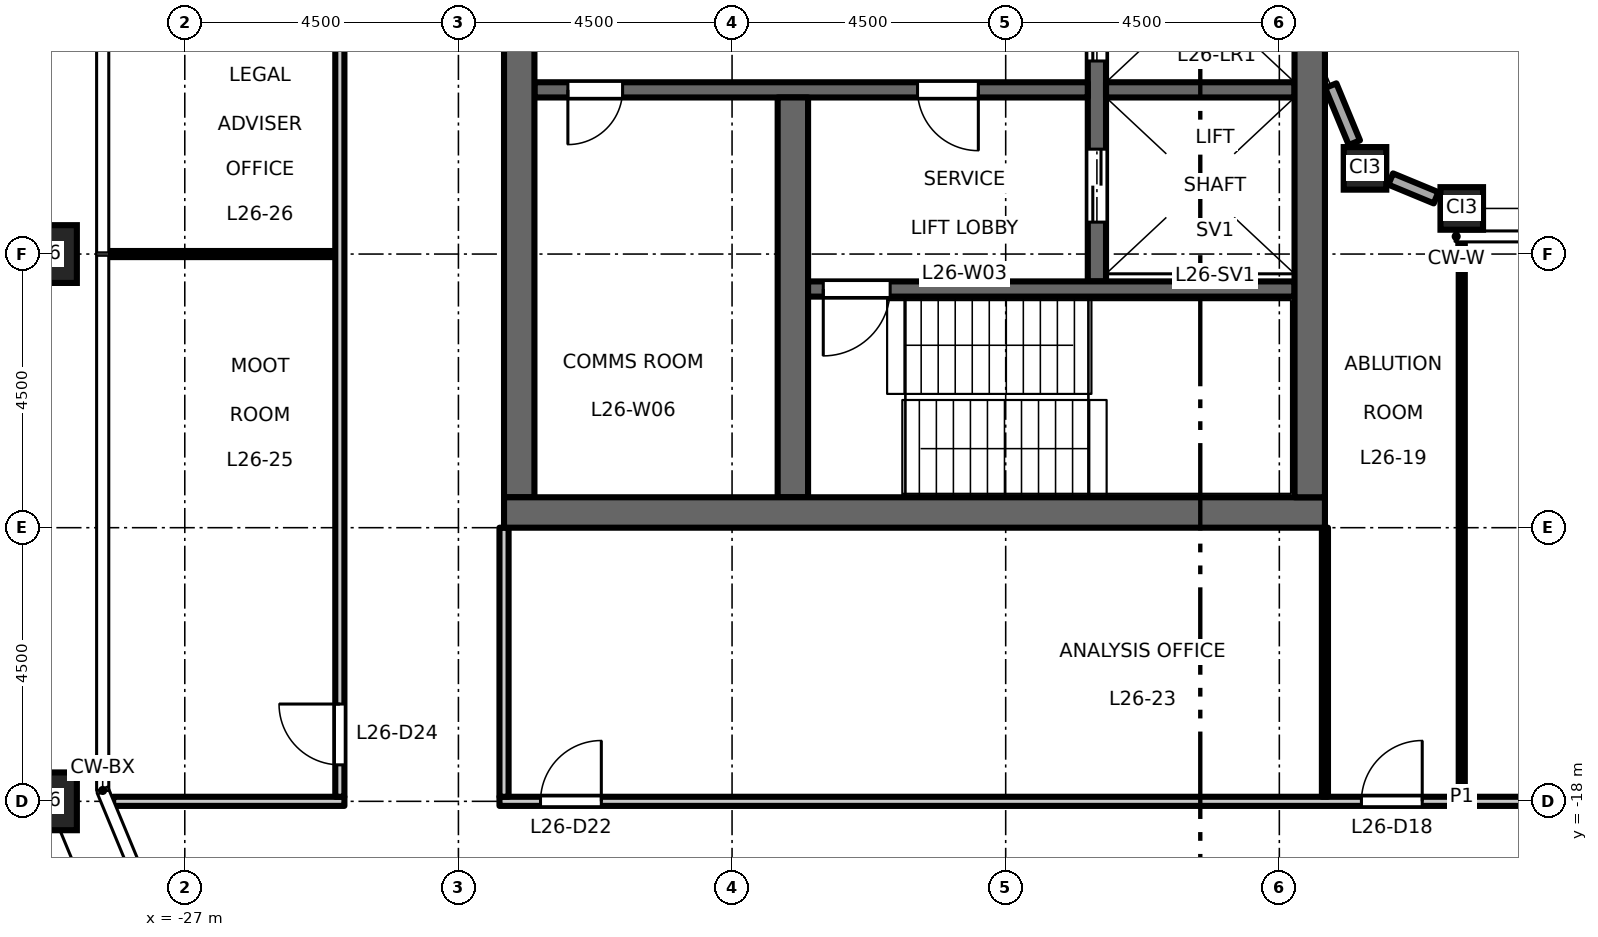
"""IFC4 building model, lengths in metres.
Left out: names, types, materials, properties, quantities, classifications, styles, units other than length and angle.
Written with IfcOpenShell. Run it as: python <this file> out.ifc"""

import sys

from ifc_helpers import new_model, si_unit, direction, frame, frame_2d, origin, origin_2d, place, context, subcontext, project, spatial, rectangle, hollow_rectangle, extrude, element, fill, save


model = new_model("IFC4")
c1 = context("Model", 3, precision=1e-05, world=origin(), true_north=direction((0.0, 1.0)))
c2 = subcontext(c1, "Body", "Model", "MODEL_VIEW")
j1 = project(units=[si_unit("LENGTHUNIT", "METRE"), si_unit("PLANEANGLEUNIT", "RADIAN")], contexts=[c1])
p1 = place(None, origin())
s1 = spatial("IfcSite", under=j1, at=p1, CompositionType="ELEMENT")
p2 = place(p1, origin())
s2 = spatial("IfcBuilding", under=s1, at=p2, CompositionType="ELEMENT")
p3 = place(p2, frame((0.0, 0.0, 122.7)))
s3 = spatial("IfcBuildingStorey", under=s2, at=p3, CompositionType="ELEMENT", Elevation=122.7)
for number, where, z_axis, x_axis in (
    (1, (-29.25, -9.0, 0.0), (0.0, 0.0, 1.0), (1.0, 0.0, 0.0)),
    (2, (-29.25, -18.0, 0.0), (0.0, 0.0, 1.0), (1.0, 0.0, 0.0)),
):
    element("IfcColumn", number, at=place(p3, frame(where, z_axis=z_axis, x_axis=x_axis)), inside=s3, PredefinedType="COLUMN", context=c2, shape_type="SweptSolid", body=[
        extrude(hollow_rectangle(XDim=0.95, YDim=0.95, WallThickness=0.055, at=origin_2d()), origin(), (0.0, 0.0, 1.0), 4.5),
    ])
for number, where, z_axis, x_axis in (
    (3, (-7.591, -7.591, 0.0), (0.0, 0.0, 1.0), (1.0, 0.0, 0.0)),
    (4, (-6.0, -8.25, 0.0), (0.0, 0.0, 1.0), (1.0, 0.0, 0.0)),
):
    element("IfcColumn", number, at=place(p3, frame(where, z_axis=z_axis, x_axis=x_axis)), inside=s3, PredefinedType="COLUMN", context=c2, shape_type="SweptSolid", body=[
        extrude(hollow_rectangle(XDim=0.7, YDim=0.7, WallThickness=0.04, at=origin_2d()), origin(), (0.0, 0.0, 1.0), 4.5),
    ])
p4 = place(p3, frame((-12.0, -9.45, 0.0), z_axis=(0.0, 0.0, 1.0), x_axis=(0.0, 1.0, 0.0)))
e5 = element("IfcWall", 5, at=p4, inside=s3, PredefinedType="SHEAR", context=c2, shape_type="SweptSolid", body=[
    extrude(rectangle(XDim=18.9, YDim=0.3, at=frame_2d((9.45, 0.0))), origin(), (0.0, 0.0, 1.0), 4.35),
])
p5 = place(p4, frame((3.625, 0.0, 0.0)))
e6 = element("IfcOpeningElement", 6, at=p5, cuts=e5, PredefinedType="OPENING", context=c2, shape_type="SweptSolid", body=[
    extrude(rectangle(XDim=1.1, YDim=2.1, at=frame_2d((0.55, 1.05))), frame((0.0, 0.16, 0.0), z_axis=(0.0, -1.0, 0.0), x_axis=(1.0, 0.0, 0.0)), (0.0, 0.0, 1.0), 0.32),
])
p6 = place(p4, frame((6.775, 0.0, 0.0)))
e7 = element("IfcOpeningElement", 7, at=p6, cuts=e5, PredefinedType="OPENING", context=c2, shape_type="SweptSolid", body=[
    extrude(rectangle(XDim=1.1, YDim=2.1, at=frame_2d((0.55, 1.05))), frame((0.0, 0.16, 0.0), z_axis=(0.0, -1.0, 0.0), x_axis=(1.0, 0.0, 0.0)), (0.0, 0.0, 1.0), 0.32),
])
p7 = place(p4, frame((9.925, 0.0, 0.0)))
e8 = element("IfcOpeningElement", 8, at=p7, cuts=e5, PredefinedType="OPENING", context=c2, shape_type="SweptSolid", body=[
    extrude(rectangle(XDim=1.1, YDim=2.1, at=frame_2d((0.55, 1.05))), frame((0.0, 0.16, 0.0), z_axis=(0.0, -1.0, 0.0), x_axis=(1.0, 0.0, 0.0)), (0.0, 0.0, 1.0), 0.32),
])
p8 = place(p4, frame((13.075, 0.0, 0.0)))
e9 = element("IfcOpeningElement", 9, at=p8, cuts=e5, PredefinedType="OPENING", context=c2, shape_type="SweptSolid", body=[
    extrude(rectangle(XDim=1.1, YDim=2.1, at=frame_2d((0.55, 1.05))), frame((0.0, 0.16, 0.0), z_axis=(0.0, -1.0, 0.0), x_axis=(1.0, 0.0, 0.0)), (0.0, 0.0, 1.0), 0.32),
])
p9 = place(p4, frame((16.725, 0.0, 0.0)))
e10 = element("IfcOpeningElement", 10, at=p9, cuts=e5, PredefinedType="OPENING", context=c2, shape_type="SweptSolid", body=[
    extrude(rectangle(XDim=1.2, YDim=2.1, at=frame_2d((0.6, 1.05))), frame((0.0, 0.16, 0.0), z_axis=(0.0, -1.0, 0.0), x_axis=(1.0, 0.0, 0.0)), (0.0, 0.0, 1.0), 0.32),
])
p10 = place(p4, frame((0.975, 0.0, 0.0)))
e11 = element("IfcOpeningElement", 11, at=p10, cuts=e5, PredefinedType="OPENING", context=c2, shape_type="SweptSolid", body=[
    extrude(rectangle(XDim=1.2, YDim=2.1, at=frame_2d((0.6, 1.05))), frame((0.0, 0.16, 0.0), z_axis=(0.0, -1.0, 0.0), x_axis=(1.0, 0.0, 0.0)), (0.0, 0.0, 1.0), 0.32),
])
p11 = place(p3, frame((-12.15, -6.3, 0.0), z_axis=(0.0, 0.0, 1.0), x_axis=(-1.0, 0.0, 0.0)))
e12 = element("IfcWall", 12, at=p11, inside=s3, PredefinedType="SHEAR", context=c2, shape_type="SweptSolid", body=[
    extrude(rectangle(XDim=9.1, YDim=0.25, at=frame_2d((4.55, 0.0))), origin(), (0.0, 0.0, 1.0), 4.35),
])
p12 = place(p11, frame((1.8, 0.0, 0.0)))
e13 = element("IfcOpeningElement", 13, at=p12, cuts=e12, PredefinedType="OPENING", context=c2, shape_type="SweptSolid", body=[
    extrude(rectangle(XDim=1.0, YDim=2.1, at=frame_2d((0.5, 1.05))), frame((0.0, 0.135, 0.0), z_axis=(0.0, -1.0, 0.0), x_axis=(1.0, 0.0, 0.0)), (0.0, 0.0, 1.0), 0.27),
])
p13 = place(p11, frame((7.65, 0.0, 0.0)))
e14 = element("IfcOpeningElement", 14, at=p13, cuts=e12, PredefinedType="OPENING", context=c2, shape_type="SweptSolid", body=[
    extrude(rectangle(XDim=0.9, YDim=2.1, at=frame_2d((0.45, 1.05))), frame((0.0, 0.135, 0.0), z_axis=(0.0, -1.0, 0.0), x_axis=(1.0, 0.0, 0.0)), (0.0, 0.0, 1.0), 0.27),
])
p14 = place(p3, frame((-21.5, -13.0, 0.0), z_axis=(0.0, 0.0, 1.0), x_axis=(0.0, 1.0, 0.0)))
e15 = element("IfcWall", 15, at=p14, inside=s3, PredefinedType="SHEAR", context=c2, shape_type="SweptSolid", body=[
    extrude(rectangle(XDim=26.0, YDim=0.5, at=frame_2d((13.0, 0.0))), origin(), (0.0, 0.0, 1.0), 4.35),
])
p15 = place(p14, frame((16.825, 0.0, 0.0)))
e16 = element("IfcOpeningElement", 16, at=p15, cuts=e15, PredefinedType="OPENING", context=c2, shape_type="SweptSolid", body=[
    extrude(rectangle(XDim=1.8, YDim=2.1, at=frame_2d((0.9, 1.05))), frame((0.0, 0.26, 0.0), z_axis=(0.0, -1.0, 0.0), x_axis=(1.0, 0.0, 0.0)), (0.0, 0.0, 1.0), 0.52),
])
p16 = place(p14, frame((7.375, 0.0, 0.0)))
e17 = element("IfcOpeningElement", 17, at=p16, cuts=e15, PredefinedType="OPENING", context=c2, shape_type="SweptSolid", body=[
    extrude(rectangle(XDim=1.8, YDim=2.1, at=frame_2d((0.9, 1.05))), frame((0.0, 0.26, 0.0), z_axis=(0.0, -1.0, 0.0), x_axis=(1.0, 0.0, 0.0)), (0.0, 0.0, 1.0), 0.52),
])
p17 = place(p3, frame((-17.0, -13.0, 0.0), z_axis=(0.0, 0.0, 1.0), x_axis=(0.0, 1.0, 0.0)))
e18 = element("IfcWall", 18, at=p17, inside=s3, PredefinedType="SHEAR", context=c2, shape_type="SweptSolid", body=[
    extrude(rectangle(XDim=6.575, YDim=0.5, at=frame_2d((3.288, 0.0))), origin(), (0.0, 0.0, 1.0), 4.35),
])
p18 = place(p3, frame((-8.75, -6.3, 0.0), z_axis=(0.0, 0.0, 1.0), x_axis=(-1.0, 0.0, 0.0)))
e19 = element("IfcWall", 19, at=p18, inside=s3, PredefinedType="SHEAR", context=c2, shape_type="SweptSolid", body=[
    extrude(rectangle(XDim=3.1, YDim=0.25, at=frame_2d((1.55, 0.0))), origin(), (0.0, 0.0, 1.0), 4.35),
])
p19 = place(p3, frame((-8.75, -9.575, 0.0), z_axis=(0.0, 0.0, 1.0), x_axis=(-1.0, 0.0, 0.0)))
e20 = element("IfcWall", 20, at=p19, inside=s3, PredefinedType="SHEAR", context=c2, shape_type="SweptSolid", body=[
    extrude(rectangle(XDim=8.0, YDim=0.25, at=frame_2d((4.0, 0.0))), origin(), (0.0, 0.0, 1.0), 4.35),
])
p20 = place(p19, frame((6.65, 0.0, 0.0)))
e21 = element("IfcOpeningElement", 21, at=p20, cuts=e20, PredefinedType="OPENING", context=c2, shape_type="SweptSolid", body=[
    extrude(rectangle(XDim=1.1, YDim=2.1, at=frame_2d((0.55, 1.05))), frame((0.0, 0.135, 0.0), z_axis=(0.0, -1.0, 0.0), x_axis=(1.0, 0.0, 0.0)), (0.0, 0.0, 1.0), 0.27),
])
p21 = place(p3, frame((-8.25, -13.25, 0.0), z_axis=(0.0, 0.0, 1.0), x_axis=(-1.0, 0.0, 0.0)))
e22 = element("IfcWall", 22, at=p21, inside=s3, PredefinedType="SHEAR", context=c2, shape_type="SweptSolid", body=[
    extrude(rectangle(XDim=13.5, YDim=0.5, at=frame_2d((6.75, 0.0))), origin(), (0.0, 0.0, 1.0), 4.35),
])
p22 = place(p3, frame((-8.5, -13.0, 0.0), z_axis=(0.0, 0.0, 1.0), x_axis=(0.0, 1.0, 0.0)))
e23 = element("IfcWall", 23, at=p22, inside=s3, PredefinedType="SHEAR", context=c2, shape_type="SweptSolid", body=[
    extrude(rectangle(XDim=26.0, YDim=0.5, at=frame_2d((13.0, 0.0))), origin(), (0.0, 0.0, 1.0), 4.35),
])
p23 = place(p3, frame((-8.154, -6.231, 0.0), z_axis=(0.0, 0.0, 1.0), x_axis=(0.382769662028, -0.923843810301, 0.0)))
e24 = element("IfcWall", 24, at=p23, inside=s3, PredefinedType="STANDARD", context=c2, shape_type="SweptSolid", body=[
    extrude(rectangle(XDim=1.015, YDim=0.2, at=frame_2d((0.507, 0.0))), origin(), (0.0, 0.0, 1.0), 3.826),
])
p24 = place(p3, frame((-7.168, -7.766, 0.0), z_axis=(0.0, 0.0, 1.0), x_axis=(0.923817771127, -0.382832503518, 0.0)))
e25 = element("IfcWall", 25, at=p24, inside=s3, PredefinedType="STANDARD", context=c2, shape_type="SweptSolid", body=[
    extrude(rectangle(XDim=0.807, YDim=0.2, at=frame_2d((0.404, 0.0))), origin(), (0.0, 0.0, 1.0), 3.826),
])
p25 = place(p3, frame((-28.178, -18.0, 0.0), z_axis=(0.0, 0.0, 1.0), x_axis=(1.0, 0.0, 0.0)))
e26 = element("IfcWall", 26, at=p25, inside=s3, PredefinedType="PARTITIONING", context=c2, shape_type="SweptSolid", body=[
    extrude(rectangle(XDim=3.803, YDim=0.15, at=frame_2d((1.901, 0.0))), origin(), (0.0, 0.0, 1.0), 4.35),
])
p26 = place(p3, frame((-21.825, -18.0, 0.0), z_axis=(0.0, 0.0, 1.0), x_axis=(1.0, 0.0, 0.0)))
e27 = element("IfcWall", 27, at=p26, inside=s3, PredefinedType="PARTITIONING", context=c2, shape_type="SweptSolid", body=[
    extrude(rectangle(XDim=43.65, YDim=0.15, at=frame_2d((21.825, 0.0))), origin(), (0.0, 0.0, 1.0), 4.35),
])
p27 = place(p26, frame((14.175, 0.0, 0.0)))
e28 = element("IfcOpeningElement", 28, at=p27, cuts=e27, PredefinedType="OPENING", context=c2, shape_type="SweptSolid", body=[
    extrude(rectangle(XDim=1.0, YDim=2.1, at=frame_2d((0.5, 1.05))), frame((0.0, 0.085, 0.0), z_axis=(0.0, -1.0, 0.0), x_axis=(1.0, 0.0, 0.0)), (0.0, 0.0, 1.0), 0.17),
])
p28 = place(p26, frame((28.425, 0.0, 0.0)))
e29 = element("IfcOpeningElement", 29, at=p28, cuts=e27, PredefinedType="OPENING", context=c2, shape_type="SweptSolid", body=[
    extrude(rectangle(XDim=1.0, YDim=2.1, at=frame_2d((0.5, 1.05))), frame((0.0, 0.085, 0.0), z_axis=(0.0, -1.0, 0.0), x_axis=(1.0, 0.0, 0.0)), (0.0, 0.0, 1.0), 0.17),
])
p29 = place(p26, frame((0.675, 0.0, 0.0)))
e30 = element("IfcOpeningElement", 30, at=p29, cuts=e27, PredefinedType="OPENING", context=c2, shape_type="SweptSolid", body=[
    extrude(rectangle(XDim=1.0, YDim=2.1, at=frame_2d((0.5, 1.05))), frame((0.0, 0.085, 0.0), z_axis=(0.0, -1.0, 0.0), x_axis=(1.0, 0.0, 0.0)), (0.0, 0.0, 1.0), 0.17),
])
p30 = place(p26, frame((41.925, 0.0, 0.0)))
e31 = element("IfcOpeningElement", 31, at=p30, cuts=e27, PredefinedType="OPENING", context=c2, shape_type="SweptSolid", body=[
    extrude(rectangle(XDim=1.0, YDim=2.1, at=frame_2d((0.5, 1.05))), frame((0.0, 0.085, 0.0), z_axis=(0.0, -1.0, 0.0), x_axis=(1.0, 0.0, 0.0)), (0.0, 0.0, 1.0), 0.17),
])
p31 = place(p3, frame((-28.26, -9.0, 0.0), z_axis=(0.0, 0.0, 1.0), x_axis=(1.0, 0.0, 0.0)))
e32 = element("IfcWall", 32, at=p31, inside=s3, PredefinedType="PARTITIONING", context=c2, shape_type="SweptSolid", body=[
    extrude(rectangle(XDim=3.735, YDim=0.1, at=frame_2d((1.868, 0.0))), origin(), (0.0, 0.0, 1.0), 4.35),
])
p32 = place(p3, frame((-24.45, -17.925, 0.0), z_axis=(0.0, 0.0, 1.0), x_axis=(0.0, 1.0, 0.0)))
e33 = element("IfcWall", 33, at=p32, inside=s3, PredefinedType="PARTITIONING", context=c2, shape_type="SweptSolid", body=[
    extrude(rectangle(XDim=35.85, YDim=0.15, at=frame_2d((17.925, 0.0))), origin(), (0.0, 0.0, 1.0), 4.35),
])
p33 = place(p32, frame((0.525, 0.0, 0.0)))
e34 = element("IfcOpeningElement", 34, at=p33, cuts=e33, PredefinedType="OPENING", context=c2, shape_type="SweptSolid", body=[
    extrude(rectangle(XDim=1.0, YDim=2.1, at=frame_2d((0.5, 1.05))), frame((0.0, 0.085, 0.0), z_axis=(0.0, -1.0, 0.0), x_axis=(1.0, 0.0, 0.0)), (0.0, 0.0, 1.0), 0.17),
])
p34 = place(p32, frame((16.275, 0.0, 0.0)))
e35 = element("IfcOpeningElement", 35, at=p34, cuts=e33, PredefinedType="OPENING", context=c2, shape_type="SweptSolid", body=[
    extrude(rectangle(XDim=1.0, YDim=2.1, at=frame_2d((0.5, 1.05))), frame((0.0, 0.085, 0.0), z_axis=(0.0, -1.0, 0.0), x_axis=(1.0, 0.0, 0.0)), (0.0, 0.0, 1.0), 0.17),
])
p35 = place(p32, frame((18.525, 0.0, 0.0)))
e36 = element("IfcOpeningElement", 36, at=p35, cuts=e33, PredefinedType="OPENING", context=c2, shape_type="SweptSolid", body=[
    extrude(rectangle(XDim=1.0, YDim=2.1, at=frame_2d((0.5, 1.05))), frame((0.0, 0.085, 0.0), z_axis=(0.0, -1.0, 0.0), x_axis=(1.0, 0.0, 0.0)), (0.0, 0.0, 1.0), 0.17),
])
p36 = place(p32, frame((34.275, 0.0, 0.0)))
e37 = element("IfcOpeningElement", 37, at=p36, cuts=e33, PredefinedType="OPENING", context=c2, shape_type="SweptSolid", body=[
    extrude(rectangle(XDim=1.0, YDim=2.1, at=frame_2d((0.5, 1.05))), frame((0.0, 0.085, 0.0), z_axis=(0.0, -1.0, 0.0), x_axis=(1.0, 0.0, 0.0)), (0.0, 0.0, 1.0), 0.17),
])
p37 = place(p3, frame((-21.75, -17.925, 0.0), z_axis=(0.0, 0.0, 1.0), x_axis=(0.0, 1.0, 0.0)))
e38 = element("IfcWall", 38, at=p37, inside=s3, PredefinedType="PARTITIONING", context=c2, shape_type="SweptSolid", body=[
    extrude(rectangle(XDim=4.425, YDim=0.15, at=frame_2d((2.212, 0.0))), origin(), (0.0, 0.0, 1.0), 4.35),
])
p38 = place(p3, frame((-8.25, -17.925, 0.0), z_axis=(0.0, 0.0, 1.0), x_axis=(0.0, 1.0, 0.0)))
e39 = element("IfcWall", 39, at=p38, inside=s3, PredefinedType="PARTITIONING", context=c2, shape_type="SweptSolid", body=[
    extrude(rectangle(XDim=4.425, YDim=0.1, at=frame_2d((2.212, 0.0))), origin(), (0.0, 0.0, 1.0), 4.35),
])
p39 = place(p3, frame((-6.0, -17.925, 0.0), z_axis=(0.0, 0.0, 1.0), x_axis=(0.0, 1.0, 0.0)))
e40 = element("IfcWall", 40, at=p39, inside=s3, PredefinedType="PARTITIONING", context=c2, shape_type="SweptSolid", body=[
    extrude(rectangle(XDim=9.275, YDim=0.1, at=frame_2d((4.638, 0.0))), origin(), (0.0, 0.0, 1.0), 4.35),
])
p40 = place(p12, origin())
e41 = element("IfcDoor", 41, at=p40, inside=s3, OperationType="SINGLE_SWING_RIGHT", PredefinedType="DOOR", context=c2, shape_type="SweptSolid", body=[
    extrude(rectangle(XDim=1.0, YDim=2.1, at=frame_2d((0.5, 1.05))), frame((0.0, 0.025, 0.0), z_axis=(0.0, -1.0, 0.0), x_axis=(1.0, 0.0, 0.0)), (0.0, 0.0, 1.0), 0.05),
])
fill(e13, e41)
p41 = place(p20, origin())
e42 = element("IfcDoor", 42, at=p41, inside=s3, OperationType="SINGLE_SWING_LEFT", PredefinedType="DOOR", context=c2, shape_type="SweptSolid", body=[
    extrude(rectangle(XDim=1.1, YDim=2.1, at=frame_2d((0.55, 1.05))), frame((0.0, 0.025, 0.0), z_axis=(0.0, -1.0, 0.0), x_axis=(1.0, 0.0, 0.0)), (0.0, 0.0, 1.0), 0.05),
])
fill(e21, e42)
p42 = place(p5, origin())
e43 = element("IfcDoor", 43, at=p42, inside=s3, OperationType="DOUBLE_DOOR_SLIDING", PredefinedType="DOOR", context=c2, shape_type="SweptSolid", body=[
    extrude(rectangle(XDim=1.1, YDim=2.1, at=frame_2d((0.55, 1.05))), frame((0.0, 0.025, 0.0), z_axis=(0.0, -1.0, 0.0), x_axis=(1.0, 0.0, 0.0)), (0.0, 0.0, 1.0), 0.05),
])
fill(e6, e43)
p43 = place(p10, origin())
e44 = element("IfcDoor", 44, at=p43, inside=s3, OperationType="DOUBLE_DOOR_SLIDING", PredefinedType="DOOR", context=c2, shape_type="SweptSolid", body=[
    extrude(rectangle(XDim=1.2, YDim=2.1, at=frame_2d((0.6, 1.05))), frame((0.0, 0.025, 0.0), z_axis=(0.0, -1.0, 0.0), x_axis=(1.0, 0.0, 0.0)), (0.0, 0.0, 1.0), 0.05),
])
fill(e11, e44)
p44 = place(p13, origin())
e45 = element("IfcDoor", 45, at=p44, inside=s3, OperationType="SINGLE_SWING_LEFT", PredefinedType="DOOR", context=c2, shape_type="SweptSolid", body=[
    extrude(rectangle(XDim=0.9, YDim=2.1, at=frame_2d((0.45, 1.05))), frame((0.0, 0.025, 0.0), z_axis=(0.0, -1.0, 0.0), x_axis=(1.0, 0.0, 0.0)), (0.0, 0.0, 1.0), 0.05),
])
fill(e14, e45)
p45 = place(p27, origin())
e46 = element("IfcDoor", 46, at=p45, inside=s3, OperationType="SINGLE_SWING_RIGHT", PredefinedType="DOOR", context=c2, shape_type="SweptSolid", body=[
    extrude(rectangle(XDim=1.0, YDim=2.1, at=frame_2d((0.5, 1.05))), frame((0.0, 0.025, 0.0), z_axis=(0.0, -1.0, 0.0), x_axis=(1.0, 0.0, 0.0)), (0.0, 0.0, 1.0), 0.05),
])
fill(e28, e46)
p46 = place(p29, origin())
e47 = element("IfcDoor", 47, at=p46, inside=s3, OperationType="SINGLE_SWING_RIGHT", PredefinedType="DOOR", context=c2, shape_type="SweptSolid", body=[
    extrude(rectangle(XDim=1.0, YDim=2.1, at=frame_2d((0.5, 1.05))), frame((0.0, 0.025, 0.0), z_axis=(0.0, -1.0, 0.0), x_axis=(1.0, 0.0, 0.0)), (0.0, 0.0, 1.0), 0.05),
])
fill(e30, e47)
p47 = place(p33, origin())
e48 = element("IfcDoor", 48, at=p47, inside=s3, OperationType="SINGLE_SWING_RIGHT", PredefinedType="DOOR", context=c2, shape_type="SweptSolid", body=[
    extrude(rectangle(XDim=1.0, YDim=2.1, at=frame_2d((0.5, 1.05))), frame((0.0, 0.025, 0.0), z_axis=(0.0, -1.0, 0.0), x_axis=(1.0, 0.0, 0.0)), (0.0, 0.0, 1.0), 0.05),
])
fill(e34, e48)
save(model, sys.argv[1])
